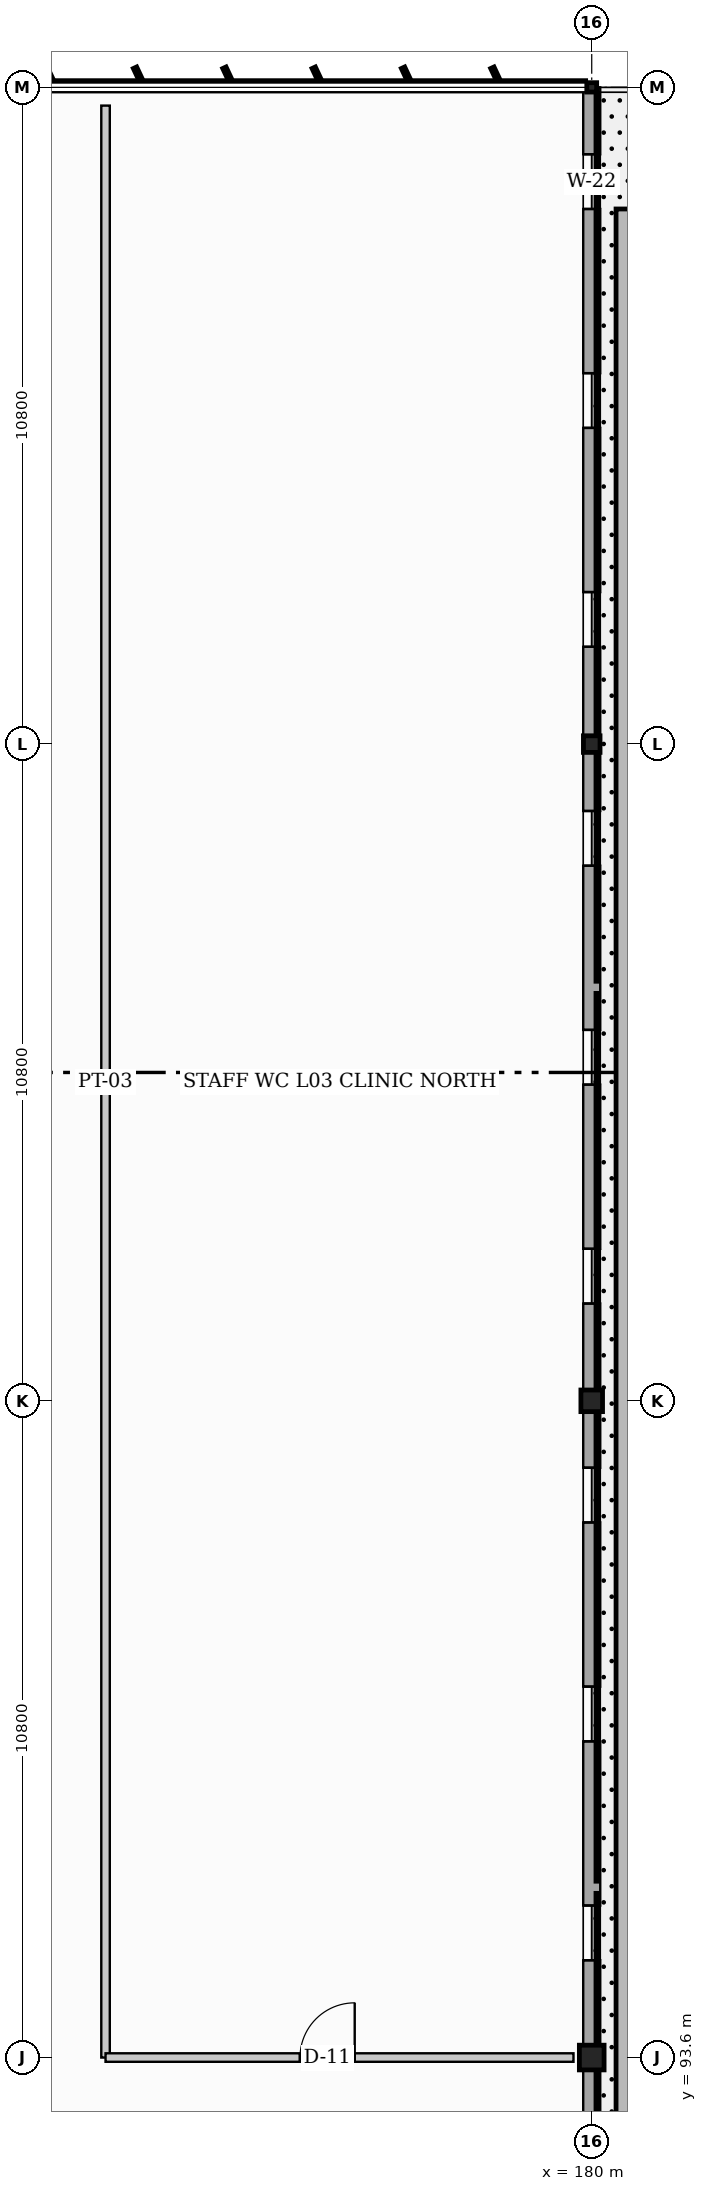
"""IFC4 building model, lengths in metres.
Left out: names, types, materials, properties, quantities, classifications, styles, units other than length and angle.
Written with IfcOpenShell. Run it as: python <this file> out.ifc"""

import sys

from ifc_helpers import new_model, si_unit, direction, frame, frame_2d, origin, origin_2d, place, context, subcontext, project, spatial, rectangle, hollow_circle, i_section, extrude, element, fill, save


model = new_model("IFC4")
c1 = context("Model", 3, precision=1e-05, world=origin(), true_north=direction((0.0, 1.0)))
c2 = subcontext(c1, "Body", "Model", "MODEL_VIEW")
j1 = project(units=[si_unit("LENGTHUNIT", "METRE"), si_unit("PLANEANGLEUNIT", "RADIAN")], contexts=[c1])
p1 = place(None, origin())
s1 = spatial("IfcSite", under=j1, at=p1, CompositionType="ELEMENT")
p2 = place(p1, origin())
s2 = spatial("IfcBuilding", under=s1, at=p2, CompositionType="ELEMENT")
p3 = place(p2, frame((0.0, 0.0, 14.4)))
s3 = spatial("IfcBuildingStorey", under=s2, at=p3, CompositionType="ELEMENT", Elevation=14.4)
p4 = place(p3, frame((180.0, 93.6, 0.0), z_axis=(0.0, 0.0, 1.0), x_axis=(0.0, 1.0, 0.0)))
e1 = element("IfcColumn", 1, at=p4, inside=s3, PredefinedType="COLUMN", context=c2, shape_type="SweptSolid", body=[
    extrude(hollow_circle(Radius=0.203, WallThickness=0.016, at=origin_2d()), origin(), (0.0, 0.0, 1.0), 3.9),
])
p5 = place(p3, frame((180.0, 104.4, 0.0), z_axis=(0.0, 0.0, 1.0), x_axis=(0.0, 1.0, 0.0)))
e2 = element("IfcColumn", 2, at=p5, inside=s3, PredefinedType="COLUMN", context=c2, shape_type="SweptSolid", body=[
    extrude(hollow_circle(Radius=0.178, WallThickness=0.013, at=origin_2d()), origin(), (0.0, 0.0, 1.0), 3.9),
])
p6 = place(p3, frame((180.0, 115.2, 0.0), z_axis=(0.0, 0.0, 1.0), x_axis=(0.0, 1.0, 0.0)))
e3 = element("IfcColumn", 3, at=p6, inside=s3, PredefinedType="COLUMN", context=c2, shape_type="SweptSolid", body=[
    extrude(hollow_circle(Radius=0.136, WallThickness=0.013, at=origin_2d()), origin(), (0.0, 0.0, 1.0), 3.9),
])
p7 = place(p3, frame((180.0, 126.0, 0.0), z_axis=(0.0, 0.0, 1.0), x_axis=(0.0, 1.0, 0.0)))
e4 = element("IfcColumn", 4, at=p7, inside=s3, PredefinedType="COLUMN", context=c2, shape_type="SweptSolid", body=[
    extrude(i_section(OverallWidth=0.154, OverallDepth=0.162, WebThickness=0.008, FlangeThickness=0.011, at=origin_2d()), origin(), (0.0, 0.0, 1.0), 3.9),
])
p8 = place(p3, frame((180.0, 126.0, 0.0), z_axis=(0.0, 0.0, 1.0), x_axis=(0.0, -1.0, 0.0)))
e5 = element("IfcWall", 5, at=p8, inside=s3, PredefinedType="STANDARD", context=c2, shape_type="SweptSolid", body=[
    extrude(rectangle(XDim=44.4, YDim=0.28, at=frame_2d((22.2, 0.0))), origin(), (0.0, 0.0, 1.0), 2.935),
])
p9 = place(p8, frame((34.0, 0.0, 0.0)))
e6 = element("IfcOpeningElement", 6, at=p9, cuts=e5, PredefinedType="OPENING", context=c2, shape_type="SweptSolid", body=[
    extrude(rectangle(XDim=2.02, YDim=2.2, at=frame_2d((1.01, 1.1))), frame((0.0, 0.15, 0.0), z_axis=(0.0, -1.0, 0.0), x_axis=(1.0, 0.0, 0.0)), (0.0, 0.0, 1.0), 0.3),
])
p10 = place(p8, frame((1.1, 0.0, 0.695)))
e7 = element("IfcOpeningElement", 7, at=p10, cuts=e5, PredefinedType="OPENING", context=c2, shape_type="SweptSolid", body=[
    extrude(rectangle(XDim=0.9, YDim=2.1, at=frame_2d((0.45, 1.05))), frame((0.0, 0.15, 0.0), z_axis=(0.0, -1.0, 0.0), x_axis=(1.0, 0.0, 0.0)), (0.0, 0.0, 1.0), 0.3),
])
p11 = place(p8, frame((4.7, 0.0, 0.695)))
e8 = element("IfcOpeningElement", 8, at=p11, cuts=e5, PredefinedType="OPENING", context=c2, shape_type="SweptSolid", body=[
    extrude(rectangle(XDim=0.9, YDim=2.1, at=frame_2d((0.45, 1.05))), frame((0.0, 0.15, 0.0), z_axis=(0.0, -1.0, 0.0), x_axis=(1.0, 0.0, 0.0)), (0.0, 0.0, 1.0), 0.3),
])
p12 = place(p8, frame((8.3, 0.0, 0.695)))
e9 = element("IfcOpeningElement", 9, at=p12, cuts=e5, PredefinedType="OPENING", context=c2, shape_type="SweptSolid", body=[
    extrude(rectangle(XDim=0.9, YDim=2.1, at=frame_2d((0.45, 1.05))), frame((0.0, 0.15, 0.0), z_axis=(0.0, -1.0, 0.0), x_axis=(1.0, 0.0, 0.0)), (0.0, 0.0, 1.0), 0.3),
])
p13 = place(p8, frame((11.9, 0.0, 0.695)))
e10 = element("IfcOpeningElement", 10, at=p13, cuts=e5, PredefinedType="OPENING", context=c2, shape_type="SweptSolid", body=[
    extrude(rectangle(XDim=0.9, YDim=2.1, at=frame_2d((0.45, 1.05))), frame((0.0, 0.15, 0.0), z_axis=(0.0, -1.0, 0.0), x_axis=(1.0, 0.0, 0.0)), (0.0, 0.0, 1.0), 0.3),
])
p14 = place(p8, frame((15.5, 0.0, 0.695)))
e11 = element("IfcOpeningElement", 11, at=p14, cuts=e5, PredefinedType="OPENING", context=c2, shape_type="SweptSolid", body=[
    extrude(rectangle(XDim=0.9, YDim=2.1, at=frame_2d((0.45, 1.05))), frame((0.0, 0.15, 0.0), z_axis=(0.0, -1.0, 0.0), x_axis=(1.0, 0.0, 0.0)), (0.0, 0.0, 1.0), 0.3),
])
p15 = place(p8, frame((19.1, 0.0, 0.695)))
e12 = element("IfcOpeningElement", 12, at=p15, cuts=e5, PredefinedType="OPENING", context=c2, shape_type="SweptSolid", body=[
    extrude(rectangle(XDim=0.9, YDim=2.1, at=frame_2d((0.45, 1.05))), frame((0.0, 0.15, 0.0), z_axis=(0.0, -1.0, 0.0), x_axis=(1.0, 0.0, 0.0)), (0.0, 0.0, 1.0), 0.3),
])
p16 = place(p8, frame((22.7, 0.0, 0.695)))
e13 = element("IfcOpeningElement", 13, at=p16, cuts=e5, PredefinedType="OPENING", context=c2, shape_type="SweptSolid", body=[
    extrude(rectangle(XDim=0.9, YDim=2.1, at=frame_2d((0.45, 1.05))), frame((0.0, 0.15, 0.0), z_axis=(0.0, -1.0, 0.0), x_axis=(1.0, 0.0, 0.0)), (0.0, 0.0, 1.0), 0.3),
])
p17 = place(p8, frame((26.3, 0.0, 0.695)))
e14 = element("IfcOpeningElement", 14, at=p17, cuts=e5, PredefinedType="OPENING", context=c2, shape_type="SweptSolid", body=[
    extrude(rectangle(XDim=0.9, YDim=2.1, at=frame_2d((0.45, 1.05))), frame((0.0, 0.15, 0.0), z_axis=(0.0, -1.0, 0.0), x_axis=(1.0, 0.0, 0.0)), (0.0, 0.0, 1.0), 0.3),
])
p18 = place(p8, frame((29.9, 0.0, 0.695)))
e15 = element("IfcOpeningElement", 15, at=p18, cuts=e5, PredefinedType="OPENING", context=c2, shape_type="SweptSolid", body=[
    extrude(rectangle(XDim=0.9, YDim=2.1, at=frame_2d((0.45, 1.05))), frame((0.0, 0.15, 0.0), z_axis=(0.0, -1.0, 0.0), x_axis=(1.0, 0.0, 0.0)), (0.0, 0.0, 1.0), 0.3),
])
p19 = place(p8, frame((37.1, 0.0, 0.695)))
e16 = element("IfcOpeningElement", 16, at=p19, cuts=e5, PredefinedType="OPENING", context=c2, shape_type="SweptSolid", body=[
    extrude(rectangle(XDim=0.9, YDim=2.1, at=frame_2d((0.45, 1.05))), frame((0.0, 0.15, 0.0), z_axis=(0.0, -1.0, 0.0), x_axis=(1.0, 0.0, 0.0)), (0.0, 0.0, 1.0), 0.3),
])
p20 = place(p8, frame((40.7, 0.0, 0.695)))
e17 = element("IfcOpeningElement", 17, at=p20, cuts=e5, PredefinedType="OPENING", context=c2, shape_type="SweptSolid", body=[
    extrude(rectangle(XDim=0.9, YDim=2.1, at=frame_2d((0.45, 1.05))), frame((0.0, 0.15, 0.0), z_axis=(0.0, -1.0, 0.0), x_axis=(1.0, 0.0, 0.0)), (0.0, 0.0, 1.0), 0.3),
])
p21 = place(p3, frame((172.004, 93.6, 0.0), z_axis=(0.0, 0.0, 1.0), x_axis=(0.0, 1.0, 0.0)))
e18 = element("IfcWall", 18, at=p21, inside=s3, PredefinedType="PARTITIONING", context=c2, shape_type="SweptSolid", body=[
    extrude(rectangle(XDim=32.1, YDim=0.14, at=frame_2d((16.05, 0.0))), origin(), (0.0, 0.0, 1.0), 2.935),
])
p22 = place(p3, frame((172.004, 93.6, 0.0), z_axis=(0.0, 0.0, 1.0), x_axis=(1.0, 0.0, 0.0)))
e19 = element("IfcWall", 19, at=p22, inside=s3, PredefinedType="PARTITIONING", context=c2, shape_type="SweptSolid", body=[
    extrude(rectangle(XDim=7.696, YDim=0.14, at=frame_2d((3.848, 0.0))), origin(), (0.0, 0.0, 1.0), 2.985),
])
p23 = place(p22, frame((3.198, 0.0, 0.0)))
e20 = element("IfcOpeningElement", 20, at=p23, cuts=e19, PredefinedType="OPENING", context=c2, shape_type="SweptSolid", body=[
    extrude(rectangle(XDim=0.9, YDim=2.1, at=frame_2d((0.45, 1.05))), frame((0.0, 0.08, 0.0), z_axis=(0.0, -1.0, 0.0), x_axis=(1.0, 0.0, 0.0)), (0.0, 0.0, 1.0), 0.16),
])
p24 = place(p10, origin())
e21 = element("IfcWindow", 21, at=p24, inside=s3, PartitioningType="SINGLE_PANEL", PredefinedType="WINDOW", context=c2, shape_type="SweptSolid", body=[
    extrude(rectangle(XDim=0.9, YDim=2.1, at=frame_2d((0.45, 1.05))), frame((0.0, 0.03, 0.0), z_axis=(0.0, -1.0, 0.0), x_axis=(1.0, 0.0, 0.0)), (0.0, 0.0, 1.0), 0.06),
])
fill(e7, e21)
p25 = place(p11, origin())
e22 = element("IfcWindow", 22, at=p25, inside=s3, PartitioningType="SINGLE_PANEL", PredefinedType="WINDOW", context=c2, shape_type="SweptSolid", body=[
    extrude(rectangle(XDim=0.9, YDim=2.1, at=frame_2d((0.45, 1.05))), frame((0.0, 0.03, 0.0), z_axis=(0.0, -1.0, 0.0), x_axis=(1.0, 0.0, 0.0)), (0.0, 0.0, 1.0), 0.06),
])
fill(e8, e22)
p26 = place(p12, origin())
e23 = element("IfcWindow", 23, at=p26, inside=s3, PartitioningType="SINGLE_PANEL", PredefinedType="WINDOW", context=c2, shape_type="SweptSolid", body=[
    extrude(rectangle(XDim=0.9, YDim=2.1, at=frame_2d((0.45, 1.05))), frame((0.0, 0.03, 0.0), z_axis=(0.0, -1.0, 0.0), x_axis=(1.0, 0.0, 0.0)), (0.0, 0.0, 1.0), 0.06),
])
fill(e9, e23)
p27 = place(p13, origin())
e24 = element("IfcWindow", 24, at=p27, inside=s3, PartitioningType="SINGLE_PANEL", PredefinedType="WINDOW", context=c2, shape_type="SweptSolid", body=[
    extrude(rectangle(XDim=0.9, YDim=2.1, at=frame_2d((0.45, 1.05))), frame((0.0, 0.03, 0.0), z_axis=(0.0, -1.0, 0.0), x_axis=(1.0, 0.0, 0.0)), (0.0, 0.0, 1.0), 0.06),
])
fill(e10, e24)
p28 = place(p14, origin())
e25 = element("IfcWindow", 25, at=p28, inside=s3, PartitioningType="SINGLE_PANEL", PredefinedType="WINDOW", context=c2, shape_type="SweptSolid", body=[
    extrude(rectangle(XDim=0.9, YDim=2.1, at=frame_2d((0.45, 1.05))), frame((0.0, 0.03, 0.0), z_axis=(0.0, -1.0, 0.0), x_axis=(1.0, 0.0, 0.0)), (0.0, 0.0, 1.0), 0.06),
])
fill(e11, e25)
p29 = place(p15, origin())
e26 = element("IfcWindow", 26, at=p29, inside=s3, PartitioningType="SINGLE_PANEL", PredefinedType="WINDOW", context=c2, shape_type="SweptSolid", body=[
    extrude(rectangle(XDim=0.9, YDim=2.1, at=frame_2d((0.45, 1.05))), frame((0.0, 0.03, 0.0), z_axis=(0.0, -1.0, 0.0), x_axis=(1.0, 0.0, 0.0)), (0.0, 0.0, 1.0), 0.06),
])
fill(e12, e26)
p30 = place(p16, origin())
e27 = element("IfcWindow", 27, at=p30, inside=s3, PartitioningType="SINGLE_PANEL", PredefinedType="WINDOW", context=c2, shape_type="SweptSolid", body=[
    extrude(rectangle(XDim=0.9, YDim=2.1, at=frame_2d((0.45, 1.05))), frame((0.0, 0.03, 0.0), z_axis=(0.0, -1.0, 0.0), x_axis=(1.0, 0.0, 0.0)), (0.0, 0.0, 1.0), 0.06),
])
fill(e13, e27)
p31 = place(p17, origin())
e28 = element("IfcWindow", 28, at=p31, inside=s3, PartitioningType="SINGLE_PANEL", PredefinedType="WINDOW", context=c2, shape_type="SweptSolid", body=[
    extrude(rectangle(XDim=0.9, YDim=2.1, at=frame_2d((0.45, 1.05))), frame((0.0, 0.03, 0.0), z_axis=(0.0, -1.0, 0.0), x_axis=(1.0, 0.0, 0.0)), (0.0, 0.0, 1.0), 0.06),
])
fill(e14, e28)
p32 = place(p18, origin())
e29 = element("IfcWindow", 29, at=p32, inside=s3, PartitioningType="SINGLE_PANEL", PredefinedType="WINDOW", context=c2, shape_type="SweptSolid", body=[
    extrude(rectangle(XDim=0.9, YDim=2.1, at=frame_2d((0.45, 1.05))), frame((0.0, 0.03, 0.0), z_axis=(0.0, -1.0, 0.0), x_axis=(1.0, 0.0, 0.0)), (0.0, 0.0, 1.0), 0.06),
])
fill(e15, e29)
p33 = place(p23, origin())
e30 = element("IfcDoor", 30, at=p33, inside=s3, OperationType="SINGLE_SWING_RIGHT", PredefinedType="DOOR", context=c2, shape_type="SweptSolid", body=[
    extrude(rectangle(XDim=0.9, YDim=2.1, at=frame_2d((0.45, 1.05))), frame((0.0, 0.025, 0.0), z_axis=(0.0, -1.0, 0.0), x_axis=(1.0, 0.0, 0.0)), (0.0, 0.0, 1.0), 0.05),
])
fill(e20, e30)
save(model, sys.argv[1])
